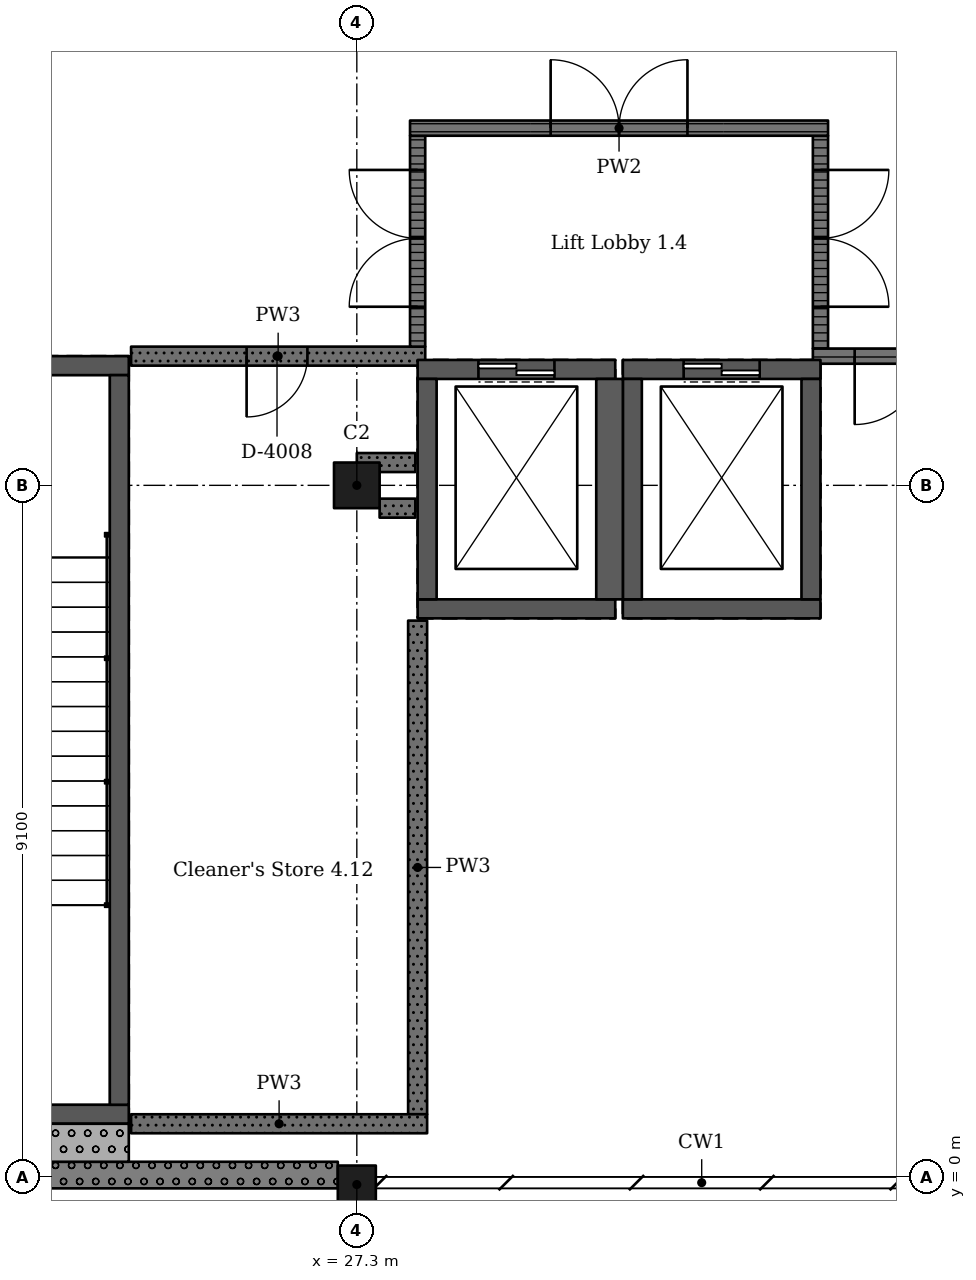
"""IFC4 building model, lengths in metres.
Left out: names, types, materials, properties, quantities, classifications, styles, units other than length and angle.
Written with IfcOpenShell. Run it as: python <this file> out.ifc"""

import sys

from ifc_helpers import new_model, si_unit, direction, frame, frame_2d, origin, origin_2d, place, context, subcontext, project, spatial, rectangle, extrude, element, fill, save


model = new_model("IFC4")
c1 = context("Model", 3, precision=1e-05, world=origin(), true_north=direction((0.0, 1.0)))
c2 = subcontext(c1, "Body", "Model", "MODEL_VIEW")
j1 = project(units=[si_unit("LENGTHUNIT", "METRE"), si_unit("PLANEANGLEUNIT", "RADIAN")], contexts=[c1])
p1 = place(None, origin())
s1 = spatial("IfcSite", under=j1, at=p1, CompositionType="ELEMENT")
p2 = place(p1, origin())
s2 = spatial("IfcBuilding", under=s1, at=p2, CompositionType="ELEMENT")
p3 = place(p2, frame((0.0, 0.0, 20.02)))
s3 = spatial("IfcBuildingStorey", under=s2, at=p3, CompositionType="ELEMENT", Elevation=20.02)
p4 = place(p3, frame((27.3, -0.1, 0.0), z_axis=(0.0, 0.0, 1.0), x_axis=(1.0, 0.0, 0.0)))
e1 = element("IfcColumn", 1, at=p4, inside=s3, PredefinedType="COLUMN", context=c2, shape_type="SweptSolid", body=[
    extrude(rectangle(XDim=0.5, YDim=0.5, at=origin_2d()), origin(), (0.0, 0.0, 1.0), 4.55),
])
p5 = place(p3, frame((27.3, 9.1, 0.0), z_axis=(0.0, 0.0, 1.0), x_axis=(1.0, 0.0, 0.0)))
e2 = element("IfcColumn", 2, at=p5, inside=s3, PredefinedType="COLUMN", context=c2, shape_type="SweptSolid", body=[
    extrude(rectangle(XDim=0.6, YDim=0.6, at=origin_2d()), origin(), (0.0, 0.0, 1.0), 4.55),
])
p6 = place(p3, frame((30.7, 7.475, 0.0), z_axis=(0.0, 0.0, 1.0), x_axis=(-1.0, 0.0, 0.0)))
e3 = element("IfcWall", 3, at=p6, inside=s3, PredefinedType="SHEAR", context=c2, shape_type="SweptSolid", body=[
    extrude(rectangle(XDim=2.6, YDim=0.25, at=frame_2d((1.3, 0.0))), origin(), (0.0, 0.0, 1.0), 4.55),
])
p7 = place(p3, frame((30.7, 10.625, 0.0), z_axis=(0.0, 0.0, 1.0), x_axis=(-1.0, 0.0, 0.0)))
e4 = element("IfcWall", 4, at=p7, inside=s3, PredefinedType="SHEAR", context=c2, shape_type="SweptSolid", body=[
    extrude(rectangle(XDim=2.6, YDim=0.25, at=frame_2d((1.3, 0.0))), origin(), (0.0, 0.0, 1.0), 4.55),
])
p8 = place(p7, frame((0.8, 0.0, 0.0)))
e5 = element("IfcOpeningElement", 5, at=p8, cuts=e4, PredefinedType="OPENING", context=c2, shape_type="SweptSolid", body=[
    extrude(rectangle(XDim=1.0, YDim=2.1, at=frame_2d((0.5, 1.05))), frame((0.0, 0.135, 0.0), z_axis=(0.0, -1.0, 0.0), x_axis=(1.0, 0.0, 0.0)), (0.0, 0.0, 1.0), 0.27),
])
p9 = place(p3, frame((28.225, 10.5, 0.0), z_axis=(0.0, 0.0, 1.0), x_axis=(0.0, -1.0, 0.0)))
e6 = element("IfcWall", 6, at=p9, inside=s3, PredefinedType="SHEAR", context=c2, shape_type="SweptSolid", body=[
    extrude(rectangle(XDim=2.9, YDim=0.25, at=frame_2d((1.45, 0.0))), origin(), (0.0, 0.0, 1.0), 4.55),
])
p10 = place(p3, frame((30.625, 10.5, 0.0), z_axis=(0.0, 0.0, 1.0), x_axis=(0.0, -1.0, 0.0)))
e7 = element("IfcWall", 7, at=p10, inside=s3, PredefinedType="SHEAR", context=c2, shape_type="SweptSolid", body=[
    extrude(rectangle(XDim=2.9, YDim=0.35, at=frame_2d((1.45, 0.0))), origin(), (0.0, 0.0, 1.0), 4.55),
])
p11 = place(p3, frame((33.4, 7.475, 0.0), z_axis=(0.0, 0.0, 1.0), x_axis=(-1.0, 0.0, 0.0)))
e8 = element("IfcWall", 8, at=p11, inside=s3, PredefinedType="SHEAR", context=c2, shape_type="SweptSolid", body=[
    extrude(rectangle(XDim=2.6, YDim=0.25, at=frame_2d((1.3, 0.0))), origin(), (0.0, 0.0, 1.0), 4.55),
])
p12 = place(p3, frame((33.4, 10.625, 0.0), z_axis=(0.0, 0.0, 1.0), x_axis=(-1.0, 0.0, 0.0)))
e9 = element("IfcWall", 9, at=p12, inside=s3, PredefinedType="SHEAR", context=c2, shape_type="SweptSolid", body=[
    extrude(rectangle(XDim=2.6, YDim=0.25, at=frame_2d((1.3, 0.0))), origin(), (0.0, 0.0, 1.0), 4.55),
])
p13 = place(p12, frame((0.8, 0.0, 0.0)))
e10 = element("IfcOpeningElement", 10, at=p13, cuts=e9, PredefinedType="OPENING", context=c2, shape_type="SweptSolid", body=[
    extrude(rectangle(XDim=1.0, YDim=2.1, at=frame_2d((0.5, 1.05))), frame((0.0, 0.135, 0.0), z_axis=(0.0, -1.0, 0.0), x_axis=(1.0, 0.0, 0.0)), (0.0, 0.0, 1.0), 0.27),
])
for number, where, z_axis, x_axis in (
    (11, (30.925, 10.5, 0.0), (0.0, 0.0, 1.0), (0.0, -1.0, 0.0)),
    (12, (33.275, 10.5, 0.0), (0.0, 0.0, 1.0), (0.0, -1.0, 0.0)),
):
    element("IfcWall", number, at=place(p3, frame(where, z_axis=z_axis, x_axis=x_axis)), inside=s3, PredefinedType="SHEAR", context=c2, shape_type="SweptSolid", body=[
        extrude(rectangle(XDim=2.9, YDim=0.25, at=frame_2d((1.45, 0.0))), origin(), (0.0, 0.0, 1.0), 4.55),
    ])
p14 = place(p3, frame((24.3, 0.825, 0.0), z_axis=(0.0, 0.0, 1.0), x_axis=(-1.0, 0.0, 0.0)))
e13 = element("IfcWall", 13, at=p14, inside=s3, PredefinedType="SHEAR", context=c2, shape_type="SweptSolid", body=[
    extrude(rectangle(XDim=5.4, YDim=0.25, at=frame_2d((2.7, 0.0))), origin(), (0.0, 0.0, 1.0), 4.55),
])
p15 = place(p3, frame((24.3, 10.675, 0.0), z_axis=(0.0, 0.0, 1.0), x_axis=(-1.0, 0.0, 0.0)))
e14 = element("IfcWall", 14, at=p15, inside=s3, PredefinedType="SHEAR", context=c2, shape_type="SweptSolid", body=[
    extrude(rectangle(XDim=5.4, YDim=0.25, at=frame_2d((2.7, 0.0))), origin(), (0.0, 0.0, 1.0), 4.55),
])
p16 = place(p15, frame((1.5, 0.0, 0.0)))
e15 = element("IfcOpeningElement", 15, at=p16, cuts=e14, PredefinedType="OPENING", context=c2, shape_type="SweptSolid", body=[
    extrude(rectangle(XDim=2.4, YDim=2.1, at=frame_2d((1.2, 1.05))), frame((0.0, 0.135, 0.0), z_axis=(0.0, -1.0, 0.0), x_axis=(1.0, 0.0, 0.0)), (0.0, 0.0, 1.0), 0.27),
])
p17 = place(p3, frame((24.175, 10.55, 0.0), z_axis=(0.0, 0.0, 1.0), x_axis=(0.0, -1.0, 0.0)))
e16 = element("IfcWall", 16, at=p17, inside=s3, PredefinedType="SHEAR", context=c2, shape_type="SweptSolid", body=[
    extrude(rectangle(XDim=9.6, YDim=0.25, at=frame_2d((4.8, 0.0))), origin(), (0.0, 0.0, 1.0), 4.55),
])
p18 = place(p3, frame((18.45, 0.025, 0.0), z_axis=(0.0, 0.0, 1.0), x_axis=(1.0, 0.0, 0.0)))
e17 = element("IfcWall", 17, at=p18, inside=s3, PredefinedType="SOLIDWALL", context=c2, shape_type="SweptSolid", body=[
    extrude(rectangle(XDim=8.6, YDim=0.35, at=frame_2d((4.3, 0.0))), origin(), (0.0, 0.0, 1.0), 3.5),
])
p19 = place(p3, frame((18.9, 0.45, 0.0), z_axis=(0.0, 0.0, 1.0), x_axis=(1.0, 0.0, 0.0)))
e18 = element("IfcWall", 18, at=p19, inside=s3, PredefinedType="SOLIDWALL", context=c2, shape_type="SweptSolid", body=[
    extrude(rectangle(XDim=5.4, YDim=0.5, at=frame_2d((2.7, 0.0))), origin(), (0.0, 0.0, 1.0), 4.25),
])
p20 = place(p3, frame((27.3, 9.4, 0.0), z_axis=(0.0, 0.0, 1.0), x_axis=(1.0, 0.0, 0.0)))
e19 = element("IfcWall", 19, at=p20, inside=s3, PredefinedType="SOLIDWALL", context=c2, shape_type="SweptSolid", body=[
    extrude(rectangle(XDim=0.77, YDim=0.25, at=frame_2d((0.385, 0.0))), origin(), (0.0, 0.0, 1.0), 4.25),
])
p21 = place(p3, frame((27.6, 8.8, 0.0), z_axis=(0.0, 0.0, 1.0), x_axis=(1.0, 0.0, 0.0)))
e20 = element("IfcWall", 20, at=p21, inside=s3, PredefinedType="SOLIDWALL", context=c2, shape_type="SweptSolid", body=[
    extrude(rectangle(XDim=0.47, YDim=0.25, at=frame_2d((0.235, 0.0))), origin(), (0.0, 0.0, 1.0), 4.25),
])
p22 = place(p3, frame((28.1, 7.32, 0.0), z_axis=(0.0, 0.0, 1.0), x_axis=(0.0, -1.0, 0.0)))
e21 = element("IfcWall", 21, at=p22, inside=s3, PredefinedType="SOLIDWALL", context=c2, shape_type="SweptSolid", body=[
    extrude(rectangle(XDim=6.495, YDim=0.25, at=frame_2d((3.248, 0.0))), origin(), (0.0, 0.0, 1.0), 4.25),
])
p23 = place(p3, frame((28.1, 13.7, 0.0), z_axis=(0.0, 0.0, 1.0), x_axis=(0.0, -1.0, 0.0)))
e22 = element("IfcWall", 22, at=p23, inside=s3, PredefinedType="PARTITIONING", context=c2, shape_type="SweptSolid", body=[
    extrude(rectangle(XDim=2.775, YDim=0.2, at=frame_2d((1.387, 0.0))), origin(), (0.0, 0.0, 1.0), 4.25),
])
p24 = place(p23, frame((0.45, 0.0, 0.0)))
e23 = element("IfcOpeningElement", 23, at=p24, cuts=e22, PredefinedType="OPENING", context=c2, shape_type="SweptSolid", body=[
    extrude(rectangle(XDim=1.8, YDim=2.4, at=frame_2d((0.9, 1.2))), frame((0.0, 0.11, 0.0), z_axis=(0.0, -1.0, 0.0), x_axis=(1.0, 0.0, 0.0)), (0.0, 0.0, 1.0), 0.22),
])
p25 = place(p3, frame((28.2, 10.8, 0.0), z_axis=(0.0, 0.0, 1.0), x_axis=(-1.0, 0.0, 0.0)))
e24 = element("IfcWall", 24, at=p25, inside=s3, PredefinedType="SOLIDWALL", context=c2, shape_type="SweptSolid", body=[
    extrude(rectangle(XDim=3.87, YDim=0.25, at=frame_2d((1.935, 0.0))), origin(), (0.0, 0.0, 1.0), 4.25),
])
p26 = place(p25, frame((1.55, 0.0, 0.0)))
e25 = element("IfcOpeningElement", 25, at=p26, cuts=e24, PredefinedType="OPENING", context=c2, shape_type="SweptSolid", body=[
    extrude(rectangle(XDim=0.8, YDim=2.1, at=frame_2d((0.4, 1.05))), frame((0.0, 0.135, 0.0), z_axis=(0.0, -1.0, 0.0), x_axis=(1.0, 0.0, 0.0)), (0.0, 0.0, 1.0), 0.27),
])
p27 = place(p3, frame((28.225, 0.7, 0.0), z_axis=(0.0, 0.0, 1.0), x_axis=(-1.0, 0.0, 0.0)))
e26 = element("IfcWall", 26, at=p27, inside=s3, PredefinedType="SOLIDWALL", context=c2, shape_type="SweptSolid", body=[
    extrude(rectangle(XDim=3.895, YDim=0.25, at=frame_2d((1.948, 0.0))), origin(), (0.0, 0.0, 1.0), 4.25),
])
p28 = place(p3, frame((33.4, 10.9, 0.0), z_axis=(0.0, 0.0, 1.0), x_axis=(0.0, 1.0, 0.0)))
e27 = element("IfcWall", 27, at=p28, inside=s3, PredefinedType="PARTITIONING", context=c2, shape_type="SweptSolid", body=[
    extrude(rectangle(XDim=2.8, YDim=0.2, at=frame_2d((1.4, 0.0))), origin(), (0.0, 0.0, 1.0), 4.25),
])
p29 = place(p28, frame((0.55, 0.0, 0.0)))
e28 = element("IfcOpeningElement", 28, at=p29, cuts=e27, PredefinedType="OPENING", context=c2, shape_type="SweptSolid", body=[
    extrude(rectangle(XDim=1.8, YDim=2.4, at=frame_2d((0.9, 1.2))), frame((0.0, 0.11, 0.0), z_axis=(0.0, -1.0, 0.0), x_axis=(1.0, 0.0, 0.0)), (0.0, 0.0, 1.0), 0.22),
])
p30 = place(p3, frame((33.5, 13.8, 0.0), z_axis=(0.0, 0.0, 1.0), x_axis=(-1.0, 0.0, 0.0)))
e29 = element("IfcWall", 29, at=p30, inside=s3, PredefinedType="PARTITIONING", context=c2, shape_type="SweptSolid", body=[
    extrude(rectangle(XDim=5.5, YDim=0.2, at=frame_2d((2.75, 0.0))), origin(), (0.0, 0.0, 1.0), 4.25),
])
p31 = place(p30, frame((1.85, 0.0, 0.0)))
e30 = element("IfcOpeningElement", 30, at=p31, cuts=e29, PredefinedType="OPENING", context=c2, shape_type="SweptSolid", body=[
    extrude(rectangle(XDim=1.8, YDim=2.4, at=frame_2d((0.9, 1.2))), frame((0.0, 0.11, 0.0), z_axis=(0.0, -1.0, 0.0), x_axis=(1.0, 0.0, 0.0)), (0.0, 0.0, 1.0), 0.22),
])
p32 = place(p3, frame((36.2, 10.8, 0.0), z_axis=(0.0, 0.0, 1.0), x_axis=(-1.0, 0.0, 0.0)))
e31 = element("IfcWall", 31, at=p32, inside=s3, PredefinedType="PARTITIONING", context=c2, shape_type="SweptSolid", body=[
    extrude(rectangle(XDim=2.9, YDim=0.2, at=frame_2d((1.45, 0.0))), origin(), (0.0, 0.0, 1.0), 4.25),
])
p33 = place(p32, frame((0.55, 0.0, 0.0)))
e32 = element("IfcOpeningElement", 32, at=p33, cuts=e31, PredefinedType="OPENING", context=c2, shape_type="SweptSolid", body=[
    extrude(rectangle(XDim=1.8, YDim=2.4, at=frame_2d((0.9, 1.2))), frame((0.0, 0.11, 0.0), z_axis=(0.0, -1.0, 0.0), x_axis=(1.0, 0.0, 0.0)), (0.0, 0.0, 1.0), 0.22),
])
p34 = place(p26, origin())
e33 = element("IfcDoor", 33, at=p34, inside=s3, OperationType="SINGLE_SWING_LEFT", PredefinedType="DOOR", context=c2, shape_type="SweptSolid", body=[
    extrude(rectangle(XDim=0.8, YDim=2.1, at=frame_2d((0.4, 1.05))), frame((0.0, 0.025, 0.0), z_axis=(0.0, -1.0, 0.0), x_axis=(1.0, 0.0, 0.0)), (0.0, 0.0, 1.0), 0.05),
])
fill(e25, e33)
p35 = place(p31, origin())
e34 = element("IfcDoor", 34, at=p35, inside=s3, OperationType="DOUBLE_DOOR_SINGLE_SWING", PredefinedType="DOOR", context=c2, shape_type="SweptSolid", body=[
    extrude(rectangle(XDim=1.8, YDim=2.4, at=frame_2d((0.9, 1.2))), frame((0.0, 0.025, 0.0), z_axis=(0.0, -1.0, 0.0), x_axis=(1.0, 0.0, 0.0)), (0.0, 0.0, 1.0), 0.05),
])
fill(e30, e34)
p36 = place(p29, origin())
e35 = element("IfcDoor", 35, at=p36, inside=s3, OperationType="DOUBLE_DOOR_SINGLE_SWING", PredefinedType="DOOR", context=c2, shape_type="SweptSolid", body=[
    extrude(rectangle(XDim=1.8, YDim=2.4, at=frame_2d((0.9, 1.2))), frame((0.0, 0.025, 0.0), z_axis=(0.0, -1.0, 0.0), x_axis=(1.0, 0.0, 0.0)), (0.0, 0.0, 1.0), 0.05),
])
fill(e28, e35)
p37 = place(p24, origin())
e36 = element("IfcDoor", 36, at=p37, inside=s3, OperationType="DOUBLE_DOOR_SINGLE_SWING", PredefinedType="DOOR", context=c2, shape_type="SweptSolid", body=[
    extrude(rectangle(XDim=1.8, YDim=2.4, at=frame_2d((0.9, 1.2))), frame((0.0, 0.025, 0.0), z_axis=(0.0, -1.0, 0.0), x_axis=(1.0, 0.0, 0.0)), (0.0, 0.0, 1.0), 0.05),
])
fill(e23, e36)
p38 = place(p33, origin())
e37 = element("IfcDoor", 37, at=p38, inside=s3, OperationType="DOUBLE_DOOR_SINGLE_SWING", PredefinedType="DOOR", context=c2, shape_type="SweptSolid", body=[
    extrude(rectangle(XDim=1.8, YDim=2.4, at=frame_2d((0.9, 1.2))), frame((0.0, 0.025, 0.0), z_axis=(0.0, -1.0, 0.0), x_axis=(1.0, 0.0, 0.0)), (0.0, 0.0, 1.0), 0.05),
])
fill(e32, e37)
p39 = place(p8, origin())
e38 = element("IfcDoor", 38, at=p39, inside=s3, OperationType="DOUBLE_DOOR_SLIDING", PredefinedType="DOOR", context=c2, shape_type="SweptSolid", body=[
    extrude(rectangle(XDim=1.0, YDim=2.1, at=frame_2d((0.5, 1.05))), frame((0.0, 0.025, 0.0), z_axis=(0.0, -1.0, 0.0), x_axis=(1.0, 0.0, 0.0)), (0.0, 0.0, 1.0), 0.05),
])
fill(e5, e38)
p40 = place(p13, origin())
e39 = element("IfcDoor", 39, at=p40, inside=s3, OperationType="DOUBLE_DOOR_SLIDING", PredefinedType="DOOR", context=c2, shape_type="SweptSolid", body=[
    extrude(rectangle(XDim=1.0, YDim=2.1, at=frame_2d((0.5, 1.05))), frame((0.0, 0.025, 0.0), z_axis=(0.0, -1.0, 0.0), x_axis=(1.0, 0.0, 0.0)), (0.0, 0.0, 1.0), 0.05),
])
fill(e10, e39)
save(model, sys.argv[1])
